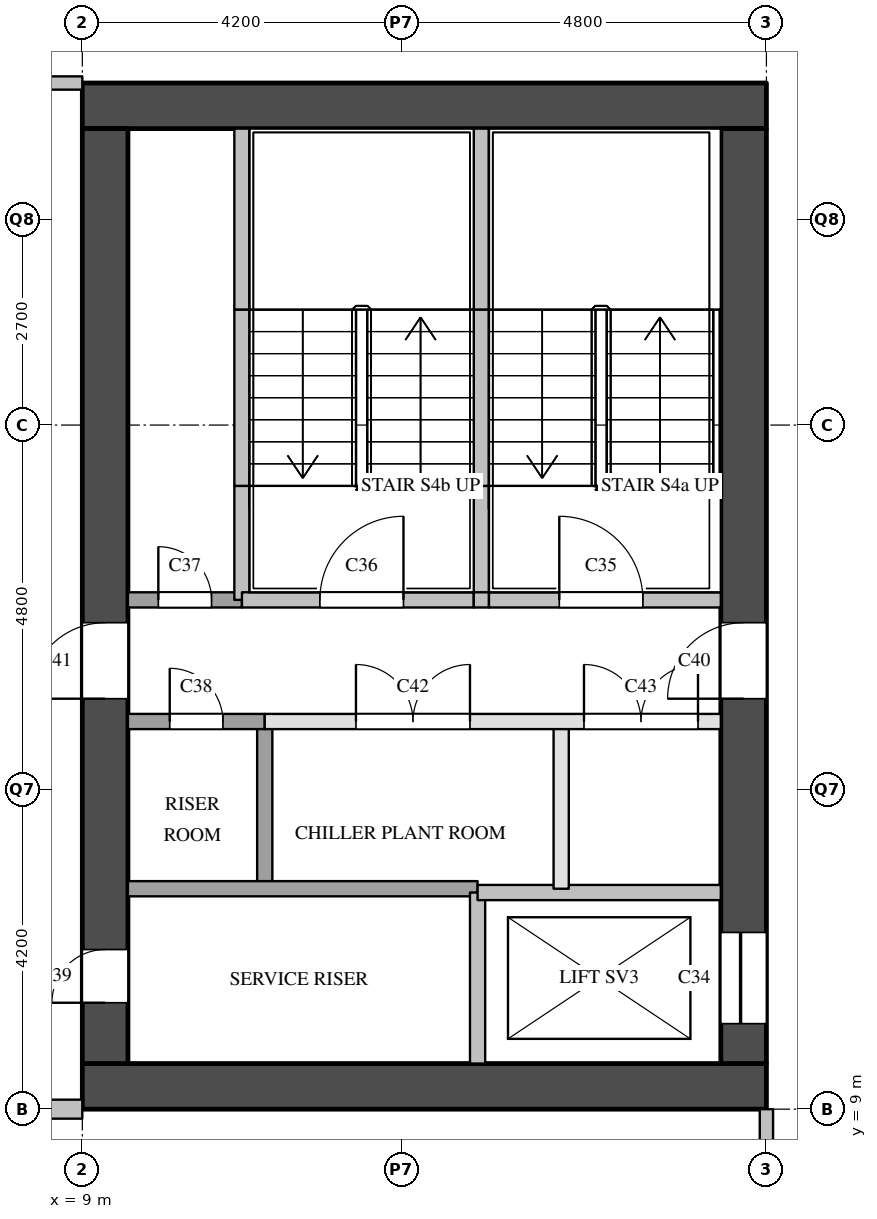
"""IFC4 building model, lengths in metres.
Left out: names, types, materials, properties, quantities, classifications, styles, units other than length and angle.
Written with IfcOpenShell. Run it as: python <this file> out.ifc"""

import sys

from ifc_helpers import new_model, si_unit, direction, frame, frame_2d, origin, place, context, subcontext, project, spatial, rectangle, extrude, element, fill, save


model = new_model("IFC4")
c1 = context("Model", 3, precision=1e-05, world=origin(), true_north=direction((0.0, 1.0)))
c2 = subcontext(c1, "Body", "Model", "MODEL_VIEW")
j1 = project(units=[si_unit("LENGTHUNIT", "METRE"), si_unit("PLANEANGLEUNIT", "RADIAN")], contexts=[c1])
p1 = place(None, origin())
s1 = spatial("IfcSite", under=j1, at=p1, CompositionType="ELEMENT")
p2 = place(p1, origin())
s2 = spatial("IfcBuilding", under=s1, at=p2, CompositionType="ELEMENT")
p3 = place(p2, frame((0.0, 0.0, -6.0)))
s3 = spatial("IfcBuildingStorey", under=s2, at=p3, CompositionType="ELEMENT", Elevation=-6.0)
for number, where, z_axis, x_axis in (
    (1, (9.0, 9.3, 0.0), (0.0, 0.0, 1.0), (1.0, 0.0, 0.0)),
    (2, (9.0, 22.2, 0.0), (0.0, 0.0, 1.0), (1.0, 0.0, 0.0)),
):
    element("IfcWall", number, at=place(p3, frame(where, z_axis=z_axis, x_axis=x_axis)), inside=s3, PredefinedType="SHEAR", context=c2, shape_type="SweptSolid", body=[
        extrude(rectangle(XDim=9.0, YDim=0.6, at=frame_2d((4.5, 0.0))), origin(), (0.0, 0.0, 1.0), 5.59),
    ])
p4 = place(p3, frame((9.3, 9.6, 0.0), z_axis=(0.0, 0.0, 1.0), x_axis=(0.0, 1.0, 0.0)))
e3 = element("IfcWall", 3, at=p4, inside=s3, PredefinedType="SHEAR", context=c2, shape_type="SweptSolid", body=[
    extrude(rectangle(XDim=12.3, YDim=0.6, at=frame_2d((6.15, 0.0))), origin(), (0.0, 0.0, 1.0), 5.59),
])
p5 = place(p4, frame((0.8, 0.0, 0.0)))
e4 = element("IfcOpeningElement", 4, at=p5, cuts=e3, PredefinedType="OPENING", context=c2, shape_type="SweptSolid", body=[
    extrude(rectangle(XDim=0.7, YDim=2.1, at=frame_2d((0.35, 1.05))), frame((0.0, 0.31, 0.0), z_axis=(0.0, -1.0, 0.0), x_axis=(1.0, 0.0, 0.0)), (0.0, 0.0, 1.0), 0.62),
])
p6 = place(p4, frame((4.8, 0.0, 0.0)))
e5 = element("IfcOpeningElement", 5, at=p6, cuts=e3, PredefinedType="OPENING", context=c2, shape_type="SweptSolid", body=[
    extrude(rectangle(XDim=1.0, YDim=2.1, at=frame_2d((0.5, 1.05))), frame((0.0, 0.31, 0.0), z_axis=(0.0, -1.0, 0.0), x_axis=(1.0, 0.0, 0.0)), (0.0, 0.0, 1.0), 0.62),
])
p7 = place(p3, frame((17.7, 9.6, 0.0), z_axis=(0.0, 0.0, 1.0), x_axis=(0.0, 1.0, 0.0)))
e6 = element("IfcWall", 6, at=p7, inside=s3, PredefinedType="SHEAR", context=c2, shape_type="SweptSolid", body=[
    extrude(rectangle(XDim=12.3, YDim=0.6, at=frame_2d((6.15, 0.0))), origin(), (0.0, 0.0, 1.0), 5.59),
])
p8 = place(p7, frame((0.525, 0.0, 0.0)))
e7 = element("IfcOpeningElement", 7, at=p8, cuts=e6, PredefinedType="OPENING", context=c2, shape_type="SweptSolid", body=[
    extrude(rectangle(XDim=1.2, YDim=2.1, at=frame_2d((0.6, 1.05))), frame((0.0, 0.31, 0.0), z_axis=(0.0, -1.0, 0.0), x_axis=(1.0, 0.0, 0.0)), (0.0, 0.0, 1.0), 0.62),
])
p9 = place(p7, frame((4.8, 0.0, 0.0)))
e8 = element("IfcOpeningElement", 8, at=p9, cuts=e6, PredefinedType="OPENING", context=c2, shape_type="SweptSolid", body=[
    extrude(rectangle(XDim=1.0, YDim=2.1, at=frame_2d((0.5, 1.05))), frame((0.0, 0.31, 0.0), z_axis=(0.0, -1.0, 0.0), x_axis=(1.0, 0.0, 0.0)), (0.0, 0.0, 1.0), 0.62),
])
p10 = place(p3, frame((11.1, 15.7, 0.0), z_axis=(0.0, 0.0, 1.0), x_axis=(0.0, 1.0, 0.0)))
e9 = element("IfcWall", 9, at=p10, inside=s3, PredefinedType="SOLIDWALL", context=c2, shape_type="SweptSolid", body=[
    extrude(rectangle(XDim=1.5, YDim=0.2, at=frame_2d((0.75, 0.0))), origin(), (0.0, 0.0, 1.0), 5.59),
])
p11 = place(p3, frame((11.1, 17.2, 0.0), z_axis=(0.0, 0.0, 1.0), x_axis=(0.0, 1.0, 0.0)))
e10 = element("IfcWall", 10, at=p11, inside=s3, PredefinedType="SOLIDWALL", context=c2, shape_type="SweptSolid", body=[
    extrude(rectangle(XDim=2.32, YDim=0.2, at=frame_2d((1.16, 0.0))), origin(), (0.0, 0.0, 1.0), 5.59),
])
p12 = place(p3, frame((11.1, 19.52, 0.0), z_axis=(0.0, 0.0, 1.0), x_axis=(0.0, 1.0, 0.0)))
e11 = element("IfcWall", 11, at=p12, inside=s3, PredefinedType="SOLIDWALL", context=c2, shape_type="SweptSolid", body=[
    extrude(rectangle(XDim=2.38, YDim=0.2, at=frame_2d((1.19, 0.0))), origin(), (0.0, 0.0, 1.0), 5.59),
])
p13 = place(p3, frame((11.4, 11.9, 0.0), z_axis=(0.0, 0.0, 1.0), x_axis=(0.0, 1.0, 0.0)))
e12 = element("IfcWall", 12, at=p13, inside=s3, PredefinedType="SOLIDWALL", context=c2, shape_type="SweptSolid", body=[
    extrude(rectangle(XDim=2.2, YDim=0.2, at=frame_2d((1.1, 0.0))), origin(), (0.0, 0.0, 1.0), 5.59),
])
p14 = place(p3, frame((14.2, 9.6, 0.0), z_axis=(0.0, 0.0, 1.0), x_axis=(0.0, 1.0, 0.0)))
e13 = element("IfcWall", 13, at=p14, inside=s3, PredefinedType="SOLIDWALL", context=c2, shape_type="SweptSolid", body=[
    extrude(rectangle(XDim=2.25, YDim=0.2, at=frame_2d((1.125, 0.0))), origin(), (0.0, 0.0, 1.0), 5.59),
])
p15 = place(p3, frame((14.2, 11.85, 0.0), z_axis=(0.0, 0.0, 1.0), x_axis=(0.0, 1.0, 0.0)))
e14 = element("IfcWall", 14, at=p15, inside=s3, PredefinedType="SOLIDWALL", context=c2, shape_type="SweptSolid", body=[
    extrude(rectangle(XDim=0.05, YDim=0.2, at=frame_2d((0.025, 0.0))), origin(), (0.0, 0.0, 1.0), 5.59),
])
p16 = place(p3, frame((14.25, 15.7, 0.0), z_axis=(0.0, 0.0, 1.0), x_axis=(0.0, 1.0, 0.0)))
e15 = element("IfcWall", 15, at=p16, inside=s3, PredefinedType="SOLIDWALL", context=c2, shape_type="SweptSolid", body=[
    extrude(rectangle(XDim=1.5, YDim=0.2, at=frame_2d((0.75, 0.0))), origin(), (0.0, 0.0, 1.0), 5.59),
])
p17 = place(p3, frame((14.25, 17.2, 0.0), z_axis=(0.0, 0.0, 1.0), x_axis=(0.0, 1.0, 0.0)))
e16 = element("IfcWall", 16, at=p17, inside=s3, PredefinedType="SOLIDWALL", context=c2, shape_type="SweptSolid", body=[
    extrude(rectangle(XDim=2.32, YDim=0.2, at=frame_2d((1.16, 0.0))), origin(), (0.0, 0.0, 1.0), 5.59),
])
p18 = place(p3, frame((14.25, 19.52, 0.0), z_axis=(0.0, 0.0, 1.0), x_axis=(0.0, 1.0, 0.0)))
e17 = element("IfcWall", 17, at=p18, inside=s3, PredefinedType="SOLIDWALL", context=c2, shape_type="SweptSolid", body=[
    extrude(rectangle(XDim=2.38, YDim=0.2, at=frame_2d((1.19, 0.0))), origin(), (0.0, 0.0, 1.0), 5.59),
])
p19 = place(p3, frame((15.3, 11.9, 0.0), z_axis=(0.0, 0.0, 1.0), x_axis=(0.0, 1.0, 0.0)))
e18 = element("IfcWall", 18, at=p19, inside=s3, PredefinedType="PARTITIONING", context=c2, shape_type="SweptSolid", body=[
    extrude(rectangle(XDim=2.2, YDim=0.2, at=frame_2d((1.1, 0.0))), origin(), (0.0, 0.0, 1.0), 5.59),
])
p20 = place(p3, frame((14.2, 11.85, 0.0), z_axis=(0.0, 0.0, 1.0), x_axis=(1.0, 0.0, 0.0)))
e19 = element("IfcWall", 19, at=p20, inside=s3, PredefinedType="SOLIDWALL", context=c2, shape_type="SweptSolid", body=[
    extrude(rectangle(XDim=3.2, YDim=0.2, at=frame_2d((1.6, 0.0))), origin(), (0.0, 0.0, 1.0), 5.59),
])
p21 = place(p3, frame((9.6, 11.9, 0.0), z_axis=(0.0, 0.0, 1.0), x_axis=(1.0, 0.0, 0.0)))
e20 = element("IfcWall", 20, at=p21, inside=s3, PredefinedType="SOLIDWALL", context=c2, shape_type="SweptSolid", body=[
    extrude(rectangle(XDim=4.6, YDim=0.2, at=frame_2d((2.3, 0.0))), origin(), (0.0, 0.0, 1.0), 5.59),
])
p22 = place(p3, frame((11.4, 14.1, 0.0), z_axis=(0.0, 0.0, 1.0), x_axis=(1.0, 0.0, 0.0)))
e21 = element("IfcWall", 21, at=p22, inside=s3, PredefinedType="PARTITIONING", context=c2, shape_type="SweptSolid", body=[
    extrude(rectangle(XDim=6.0, YDim=0.2, at=frame_2d((3.0, 0.0))), origin(), (0.0, 0.0, 1.0), 5.59),
])
p23 = place(p22, frame((1.2, 0.0, 0.0)))
e22 = element("IfcOpeningElement", 22, at=p23, cuts=e21, PredefinedType="OPENING", context=c2, shape_type="SweptSolid", body=[
    extrude(rectangle(XDim=1.5, YDim=2.1, at=frame_2d((0.75, 1.05))), frame((0.0, 0.11, 0.0), z_axis=(0.0, -1.0, 0.0), x_axis=(1.0, 0.0, 0.0)), (0.0, 0.0, 1.0), 0.22),
])
p24 = place(p22, frame((4.2, 0.0, 0.0)))
e23 = element("IfcOpeningElement", 23, at=p24, cuts=e21, PredefinedType="OPENING", context=c2, shape_type="SweptSolid", body=[
    extrude(rectangle(XDim=1.5, YDim=2.1, at=frame_2d((0.75, 1.05))), frame((0.0, 0.11, 0.0), z_axis=(0.0, -1.0, 0.0), x_axis=(1.0, 0.0, 0.0)), (0.0, 0.0, 1.0), 0.22),
])
p25 = place(p3, frame((9.6, 14.1, 0.0), z_axis=(0.0, 0.0, 1.0), x_axis=(1.0, 0.0, 0.0)))
e24 = element("IfcWall", 24, at=p25, inside=s3, PredefinedType="SOLIDWALL", context=c2, shape_type="SweptSolid", body=[
    extrude(rectangle(XDim=1.8, YDim=0.2, at=frame_2d((0.9, 0.0))), origin(), (0.0, 0.0, 1.0), 5.59),
])
p26 = place(p25, frame((0.55, 0.0, 0.0)))
e25 = element("IfcOpeningElement", 25, at=p26, cuts=e24, PredefinedType="OPENING", context=c2, shape_type="SweptSolid", body=[
    extrude(rectangle(XDim=0.7, YDim=2.1, at=frame_2d((0.35, 1.05))), frame((0.0, 0.11, 0.0), z_axis=(0.0, -1.0, 0.0), x_axis=(1.0, 0.0, 0.0)), (0.0, 0.0, 1.0), 0.22),
])
p27 = place(p3, frame((9.6, 15.7, 0.0), z_axis=(0.0, 0.0, 1.0), x_axis=(1.0, 0.0, 0.0)))
e26 = element("IfcWall", 26, at=p27, inside=s3, PredefinedType="SOLIDWALL", context=c2, shape_type="SweptSolid", body=[
    extrude(rectangle(XDim=1.5, YDim=0.2, at=frame_2d((0.75, 0.0))), origin(), (0.0, 0.0, 1.0), 5.59),
])
p28 = place(p27, frame((0.4, 0.0, 0.0)))
e27 = element("IfcOpeningElement", 27, at=p28, cuts=e26, PredefinedType="OPENING", context=c2, shape_type="SweptSolid", body=[
    extrude(rectangle(XDim=0.7, YDim=2.1, at=frame_2d((0.35, 1.05))), frame((0.0, 0.11, 0.0), z_axis=(0.0, -1.0, 0.0), x_axis=(1.0, 0.0, 0.0)), (0.0, 0.0, 1.0), 0.22),
])
p29 = place(p3, frame((11.1, 15.7, 0.0), z_axis=(0.0, 0.0, 1.0), x_axis=(1.0, 0.0, 0.0)))
e28 = element("IfcWall", 28, at=p29, inside=s3, PredefinedType="SOLIDWALL", context=c2, shape_type="SweptSolid", body=[
    extrude(rectangle(XDim=3.05, YDim=0.2, at=frame_2d((1.525, 0.0))), origin(), (0.0, 0.0, 1.0), 5.59),
])
p30 = place(p29, frame((1.025, 0.0, 0.0)))
e29 = element("IfcOpeningElement", 29, at=p30, cuts=e28, PredefinedType="OPENING", context=c2, shape_type="SweptSolid", body=[
    extrude(rectangle(XDim=1.1, YDim=2.1, at=frame_2d((0.55, 1.05))), frame((0.0, 0.11, 0.0), z_axis=(0.0, -1.0, 0.0), x_axis=(1.0, 0.0, 0.0)), (0.0, 0.0, 1.0), 0.22),
])
p31 = place(p3, frame((14.15, 15.7, 0.0), z_axis=(0.0, 0.0, 1.0), x_axis=(1.0, 0.0, 0.0)))
e30 = element("IfcWall", 30, at=p31, inside=s3, PredefinedType="SOLIDWALL", context=c2, shape_type="SweptSolid", body=[
    extrude(rectangle(XDim=0.2, YDim=0.2, at=frame_2d((0.1, 0.0))), origin(), (0.0, 0.0, 1.0), 5.59),
])
p32 = place(p3, frame((14.35, 15.7, 0.0), z_axis=(0.0, 0.0, 1.0), x_axis=(1.0, 0.0, 0.0)))
e31 = element("IfcWall", 31, at=p32, inside=s3, PredefinedType="SOLIDWALL", context=c2, shape_type="SweptSolid", body=[
    extrude(rectangle(XDim=3.05, YDim=0.2, at=frame_2d((1.525, 0.0))), origin(), (0.0, 0.0, 1.0), 5.59),
])
p33 = place(p32, frame((0.925, 0.0, 0.0)))
e32 = element("IfcOpeningElement", 32, at=p33, cuts=e31, PredefinedType="OPENING", context=c2, shape_type="SweptSolid", body=[
    extrude(rectangle(XDim=1.1, YDim=2.1, at=frame_2d((0.55, 1.05))), frame((0.0, 0.11, 0.0), z_axis=(0.0, -1.0, 0.0), x_axis=(1.0, 0.0, 0.0)), (0.0, 0.0, 1.0), 0.22),
])
p34 = place(p3, frame((0.0, 22.5, 0.0), z_axis=(0.0, 0.0, 1.0), x_axis=(1.0, 0.0, 0.0)))
e33 = element("IfcWall", 33, at=p34, inside=s3, PredefinedType="PARTITIONING", context=c2, shape_type="SweptSolid", body=[
    extrude(rectangle(XDim=9.0, YDim=0.175, at=frame_2d((4.5, 0.0))), origin(), (0.0, 0.0, 1.0), 5.59),
])
p35 = place(p34, frame((4.0, 0.0, 0.0)))
e34 = element("IfcOpeningElement", 34, at=p35, cuts=e33, PredefinedType="OPENING", context=c2, shape_type="SweptSolid", body=[
    extrude(rectangle(XDim=1.0, YDim=2.1, at=frame_2d((0.5, 1.05))), frame((0.0, 0.097, 0.0), z_axis=(0.0, -1.0, 0.0), x_axis=(1.0, 0.0, 0.0)), (0.0, 0.0, 1.0), 0.195),
])
p36 = place(p3, frame((18.0, 0.0, 0.0), z_axis=(0.0, 0.0, 1.0), x_axis=(0.0, 1.0, 0.0)))
e35 = element("IfcWall", 35, at=p36, inside=s3, PredefinedType="PARTITIONING", context=c2, shape_type="SweptSolid", body=[
    extrude(rectangle(XDim=9.0, YDim=0.175, at=frame_2d((4.5, 0.0))), origin(), (0.0, 0.0, 1.0), 5.59),
])
p37 = place(p36, frame((4.0, 0.0, 0.0)))
e36 = element("IfcOpeningElement", 36, at=p37, cuts=e35, PredefinedType="OPENING", context=c2, shape_type="SweptSolid", body=[
    extrude(rectangle(XDim=1.0, YDim=2.1, at=frame_2d((0.5, 1.05))), frame((0.0, 0.097, 0.0), z_axis=(0.0, -1.0, 0.0), x_axis=(1.0, 0.0, 0.0)), (0.0, 0.0, 1.0), 0.195),
])
p38 = place(p3, frame((0.0, 9.0, 0.0), z_axis=(0.0, 0.0, 1.0), x_axis=(1.0, 0.0, 0.0)))
e37 = element("IfcWall", 37, at=p38, inside=s3, PredefinedType="PARTITIONING", context=c2, shape_type="SweptSolid", body=[
    extrude(rectangle(XDim=9.0, YDim=0.25, at=frame_2d((4.5, 0.0))), origin(), (0.0, 0.0, 1.0), 5.59),
])
p39 = place(p8, origin())
e38 = element("IfcDoor", 38, at=p39, inside=s3, OperationType="SLIDING_TO_LEFT", PredefinedType="DOOR", context=c2, shape_type="SweptSolid", body=[
    extrude(rectangle(XDim=1.2, YDim=2.1, at=frame_2d((0.6, 1.05))), frame((0.0, 0.025, 0.0), z_axis=(0.0, -1.0, 0.0), x_axis=(1.0, 0.0, 0.0)), (0.0, 0.0, 1.0), 0.05),
])
fill(e7, e38)
p40 = place(p33, origin())
e39 = element("IfcDoor", 39, at=p40, inside=s3, OperationType="SINGLE_SWING_LEFT", PredefinedType="DOOR", context=c2, shape_type="SweptSolid", body=[
    extrude(rectangle(XDim=1.1, YDim=2.1, at=frame_2d((0.55, 1.05))), frame((0.0, 0.025, 0.0), z_axis=(0.0, -1.0, 0.0), x_axis=(1.0, 0.0, 0.0)), (0.0, 0.0, 1.0), 0.05),
])
fill(e32, e39)
p41 = place(p30, origin())
e40 = element("IfcDoor", 40, at=p41, inside=s3, OperationType="SINGLE_SWING_RIGHT", PredefinedType="DOOR", context=c2, shape_type="SweptSolid", body=[
    extrude(rectangle(XDim=1.1, YDim=2.1, at=frame_2d((0.55, 1.05))), frame((0.0, 0.025, 0.0), z_axis=(0.0, -1.0, 0.0), x_axis=(1.0, 0.0, 0.0)), (0.0, 0.0, 1.0), 0.05),
])
fill(e29, e40)
p42 = place(p28, origin())
e41 = element("IfcDoor", 41, at=p42, inside=s3, OperationType="SINGLE_SWING_LEFT", PredefinedType="DOOR", context=c2, shape_type="SweptSolid", body=[
    extrude(rectangle(XDim=0.7, YDim=2.1, at=frame_2d((0.35, 1.05))), frame((0.0, 0.025, 0.0), z_axis=(0.0, -1.0, 0.0), x_axis=(1.0, 0.0, 0.0)), (0.0, 0.0, 1.0), 0.05),
])
fill(e27, e41)
p43 = place(p26, origin())
e42 = element("IfcDoor", 42, at=p43, inside=s3, OperationType="SINGLE_SWING_LEFT", PredefinedType="DOOR", context=c2, shape_type="SweptSolid", body=[
    extrude(rectangle(XDim=0.7, YDim=2.1, at=frame_2d((0.35, 1.05))), frame((0.0, 0.025, 0.0), z_axis=(0.0, -1.0, 0.0), x_axis=(1.0, 0.0, 0.0)), (0.0, 0.0, 1.0), 0.05),
])
fill(e25, e42)
p44 = place(p5, origin())
e43 = element("IfcDoor", 43, at=p44, inside=s3, OperationType="SINGLE_SWING_LEFT", PredefinedType="DOOR", context=c2, shape_type="SweptSolid", body=[
    extrude(rectangle(XDim=0.7, YDim=2.1, at=frame_2d((0.35, 1.05))), frame((0.0, 0.025, 0.0), z_axis=(0.0, -1.0, 0.0), x_axis=(1.0, 0.0, 0.0)), (0.0, 0.0, 1.0), 0.05),
])
fill(e4, e43)
p45 = place(p9, origin())
e44 = element("IfcDoor", 44, at=p45, inside=s3, OperationType="SINGLE_SWING_LEFT", PredefinedType="DOOR", context=c2, shape_type="SweptSolid", body=[
    extrude(rectangle(XDim=1.0, YDim=2.1, at=frame_2d((0.5, 1.05))), frame((0.0, 0.025, 0.0), z_axis=(0.0, -1.0, 0.0), x_axis=(1.0, 0.0, 0.0)), (0.0, 0.0, 1.0), 0.05),
])
fill(e8, e44)
p46 = place(p6, origin())
e45 = element("IfcDoor", 45, at=p46, inside=s3, OperationType="SINGLE_SWING_LEFT", PredefinedType="DOOR", context=c2, shape_type="SweptSolid", body=[
    extrude(rectangle(XDim=1.0, YDim=2.1, at=frame_2d((0.5, 1.05))), frame((0.0, 0.025, 0.0), z_axis=(0.0, -1.0, 0.0), x_axis=(1.0, 0.0, 0.0)), (0.0, 0.0, 1.0), 0.05),
])
fill(e5, e45)
p47 = place(p23, origin())
e46 = element("IfcDoor", 46, at=p47, inside=s3, OperationType="DOUBLE_DOOR_SINGLE_SWING", PredefinedType="DOOR", context=c2, shape_type="SweptSolid", body=[
    extrude(rectangle(XDim=1.5, YDim=2.1, at=frame_2d((0.75, 1.05))), frame((0.0, 0.025, 0.0), z_axis=(0.0, -1.0, 0.0), x_axis=(1.0, 0.0, 0.0)), (0.0, 0.0, 1.0), 0.05),
])
fill(e22, e46)
p48 = place(p24, origin())
e47 = element("IfcDoor", 47, at=p48, inside=s3, OperationType="DOUBLE_DOOR_SINGLE_SWING", PredefinedType="DOOR", context=c2, shape_type="SweptSolid", body=[
    extrude(rectangle(XDim=1.5, YDim=2.1, at=frame_2d((0.75, 1.05))), frame((0.0, 0.025, 0.0), z_axis=(0.0, -1.0, 0.0), x_axis=(1.0, 0.0, 0.0)), (0.0, 0.0, 1.0), 0.05),
])
fill(e23, e47)
save(model, sys.argv[1])
